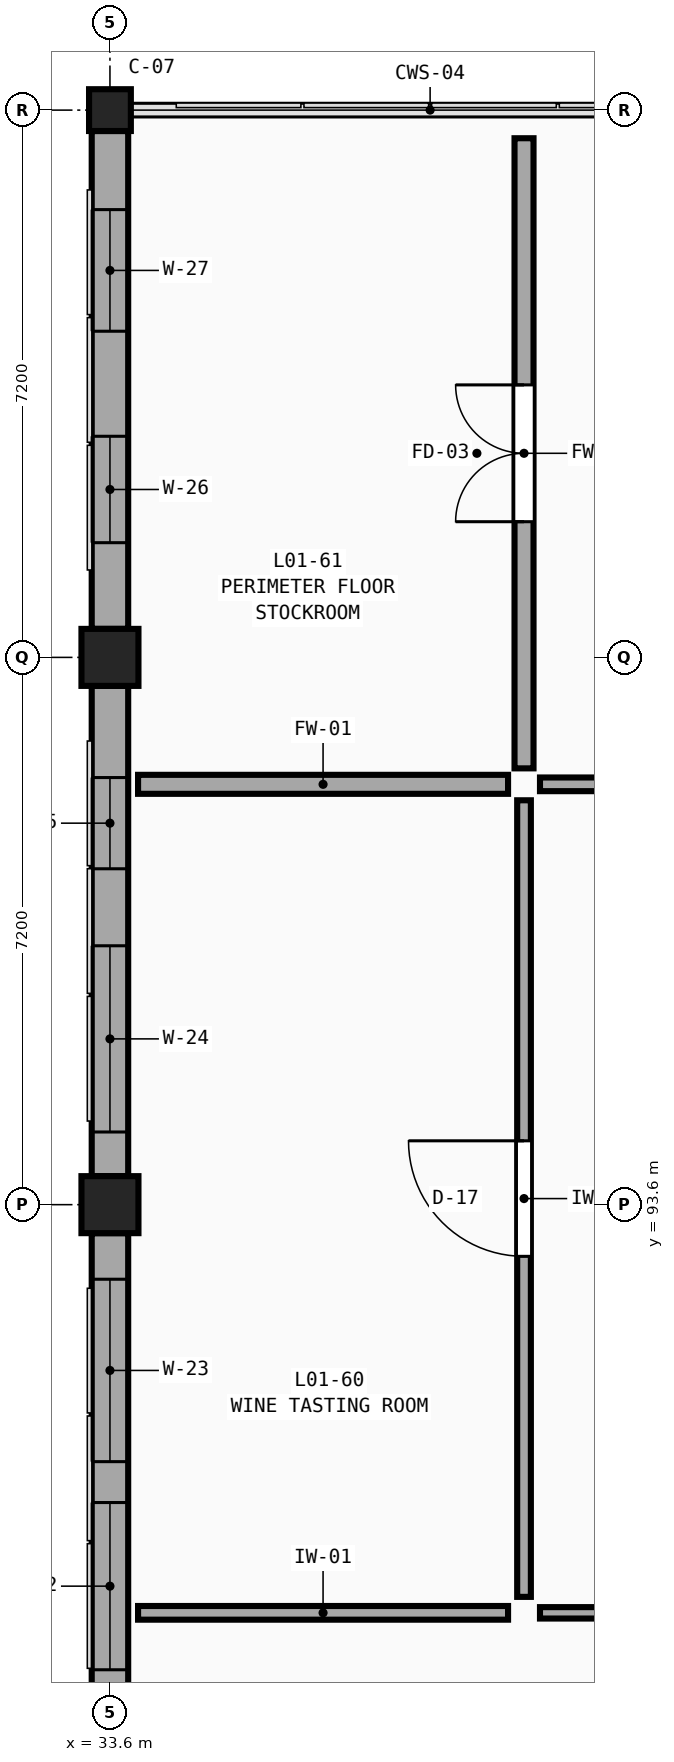
"""IFC4 building model, lengths in metres.
Left out: names, types, materials, properties, quantities, classifications, styles, units other than length and angle.
Written with IfcOpenShell. Run it as: python <this file> out.ifc"""

import sys

from ifc_helpers import new_model, si_unit, direction, frame, frame_2d, origin, origin_2d, place, context, subcontext, project, spatial, rectangle, extrude, element, fill, save


model = new_model("IFC4")
c1 = context("Model", 3, precision=1e-05, world=origin(), true_north=direction((0.0, 1.0)))
c2 = subcontext(c1, "Body", "Model", "MODEL_VIEW")
j1 = project(units=[si_unit("LENGTHUNIT", "METRE"), si_unit("PLANEANGLEUNIT", "RADIAN")], contexts=[c1])
p1 = place(None, origin())
s1 = spatial("IfcSite", under=j1, at=p1, CompositionType="ELEMENT")
p2 = place(p1, origin())
s2 = spatial("IfcBuilding", under=s1, at=p2, CompositionType="ELEMENT")
p3 = place(p2, frame((0.0, 0.0, 5.4)))
s3 = spatial("IfcBuildingStorey", under=s2, at=p3, CompositionType="ELEMENT", Elevation=5.4)
for number, where, z_axis, x_axis in (
    (1, (33.6, 93.6, 0.0), (0.0, 0.0, 1.0), (1.0, 0.0, 0.0)),
    (2, (33.6, 100.8, 0.0), (0.0, 0.0, 1.0), (1.0, 0.0, 0.0)),
):
    element("IfcColumn", number, at=place(p3, frame(where, z_axis=z_axis, x_axis=x_axis)), inside=s3, PredefinedType="COLUMN", context=c2, shape_type="SweptSolid", body=[
        extrude(rectangle(XDim=0.75, YDim=0.75, at=origin_2d()), origin(), (0.0, 0.0, 1.0), 4.5),
    ])
p4 = place(p3, frame((33.6, 108.0, 0.0), z_axis=(0.0, 0.0, 1.0), x_axis=(1.0, 0.0, 0.0)))
e3 = element("IfcColumn", 3, at=p4, inside=s3, PredefinedType="COLUMN", context=c2, shape_type="SweptSolid", body=[
    extrude(rectangle(XDim=0.55, YDim=0.55, at=origin_2d()), origin(), (0.0, 0.0, 1.0), 4.5),
])
p5 = place(p3, frame((33.6, 86.775, 0.0), z_axis=(0.0, 0.0, 1.0), x_axis=(0.0, 1.0, 0.0)))
e4 = element("IfcWall", 4, at=p5, inside=s3, PredefinedType="SOLIDWALL", context=c2, shape_type="SweptSolid", body=[
    extrude(rectangle(XDim=6.45, YDim=0.48, at=frame_2d((3.225, 0.0))), origin(), (0.0, 0.0, 1.0), 3.63),
])
p6 = place(p5, frame((0.706, 0.0, 0.75)))
e5 = element("IfcOpeningElement", 5, at=p6, cuts=e4, PredefinedType="OPENING", context=c2, shape_type="SweptSolid", body=[
    extrude(rectangle(XDim=2.2, YDim=2.26, at=frame_2d((1.1, 1.13))), frame((0.0, 0.26, 0.0), z_axis=(0.0, -1.0, 0.0), x_axis=(1.0, 0.0, 0.0)), (0.0, 0.0, 1.0), 0.52),
])
p7 = place(p5, frame((3.444, 0.0, 0.75)))
e6 = element("IfcOpeningElement", 6, at=p7, cuts=e4, PredefinedType="OPENING", context=c2, shape_type="SweptSolid", body=[
    extrude(rectangle(XDim=2.4, YDim=2.26, at=frame_2d((1.2, 1.13))), frame((0.0, 0.26, 0.0), z_axis=(0.0, -1.0, 0.0), x_axis=(1.0, 0.0, 0.0)), (0.0, 0.0, 1.0), 0.52),
])
p8 = place(p3, frame((33.6, 93.975, 0.0), z_axis=(0.0, 0.0, 1.0), x_axis=(0.0, 1.0, 0.0)))
e7 = element("IfcWall", 7, at=p8, inside=s3, PredefinedType="SOLIDWALL", context=c2, shape_type="SweptSolid", body=[
    extrude(rectangle(XDim=6.45, YDim=0.48, at=frame_2d((3.225, 0.0))), origin(), (0.0, 0.0, 1.0), 3.63),
])
p9 = place(p8, frame((0.581, 0.0, 0.75)))
e8 = element("IfcOpeningElement", 8, at=p9, cuts=e7, PredefinedType="OPENING", context=c2, shape_type="SweptSolid", body=[
    extrude(rectangle(XDim=2.45, YDim=2.26, at=frame_2d((1.225, 1.13))), frame((0.0, 0.26, 0.0), z_axis=(0.0, -1.0, 0.0), x_axis=(1.0, 0.0, 0.0)), (0.0, 0.0, 1.0), 0.52),
])
p10 = place(p8, frame((4.044, 0.0, 0.75)))
e9 = element("IfcOpeningElement", 9, at=p10, cuts=e7, PredefinedType="OPENING", context=c2, shape_type="SweptSolid", body=[
    extrude(rectangle(XDim=1.2, YDim=2.44, at=frame_2d((0.6, 1.22))), frame((0.0, 0.26, 0.0), z_axis=(0.0, -1.0, 0.0), x_axis=(1.0, 0.0, 0.0)), (0.0, 0.0, 1.0), 0.52),
])
p11 = place(p3, frame((33.6, 101.175, 0.0), z_axis=(0.0, 0.0, 1.0), x_axis=(0.0, 1.0, 0.0)))
e10 = element("IfcWall", 10, at=p11, inside=s3, PredefinedType="SOLIDWALL", context=c2, shape_type="SweptSolid", body=[
    extrude(rectangle(XDim=6.55, YDim=0.48, at=frame_2d((3.275, 0.0))), origin(), (0.0, 0.0, 1.0), 3.63),
])
p12 = place(p11, frame((1.134, 0.0, 0.75)))
e11 = element("IfcOpeningElement", 11, at=p12, cuts=e10, PredefinedType="OPENING", context=c2, shape_type="SweptSolid", body=[
    extrude(rectangle(XDim=1.4, YDim=2.44, at=frame_2d((0.7, 1.22))), frame((0.0, 0.26, 0.0), z_axis=(0.0, -1.0, 0.0), x_axis=(1.0, 0.0, 0.0)), (0.0, 0.0, 1.0), 0.52),
])
p13 = place(p11, frame((3.916, 0.0, 0.75)))
e12 = element("IfcOpeningElement", 12, at=p13, cuts=e10, PredefinedType="OPENING", context=c2, shape_type="SweptSolid", body=[
    extrude(rectangle(XDim=1.6, YDim=2.44, at=frame_2d((0.8, 1.22))), frame((0.0, 0.26, 0.0), z_axis=(0.0, -1.0, 0.0), x_axis=(1.0, 0.0, 0.0)), (0.0, 0.0, 1.0), 0.52),
])
p14 = place(p3, frame((39.258, 99.13, 0.0), z_axis=(0.0, 0.0, 1.0), x_axis=(1.0, 0.0, 0.0)))
e13 = element("IfcWall", 13, at=p14, inside=s3, PredefinedType="PARTITIONING", context=c2, shape_type="SweptSolid", body=[
    extrude(rectangle(XDim=22.444, YDim=0.18, at=frame_2d((11.222, 0.0))), origin(), (0.0, 0.0, 1.0), 4.18),
])
p15 = place(p14, frame((8.99, 0.0, 0.0)))
e14 = element("IfcOpeningElement", 14, at=p15, cuts=e13, PredefinedType="OPENING", context=c2, shape_type="SweptSolid", body=[
    extrude(rectangle(XDim=1.04, YDim=2.21, at=frame_2d((0.52, 1.105))), frame((0.0, 0.11, 0.0), z_axis=(0.0, -1.0, 0.0), x_axis=(1.0, 0.0, 0.0)), (0.0, 0.0, 1.0), 0.22),
])
p16 = place(p3, frame((39.258, 88.23, 0.0), z_axis=(0.0, 0.0, 1.0), x_axis=(1.0, 0.0, 0.0)))
e15 = element("IfcWall", 15, at=p16, inside=s3, PredefinedType="PARTITIONING", context=c2, shape_type="SweptSolid", body=[
    extrude(rectangle(XDim=13.952, YDim=0.15, at=frame_2d((6.976, 0.0))), origin(), (0.0, 0.0, 1.0), 4.18),
])
p17 = place(p3, frame((39.048, 88.44, 0.0), z_axis=(0.0, 0.0, 1.0), x_axis=(0.0, 1.0, 0.0)))
e16 = element("IfcWall", 16, at=p17, inside=s3, PredefinedType="PARTITIONING", context=c2, shape_type="SweptSolid", body=[
    extrude(rectangle(XDim=10.48, YDim=0.18, at=frame_2d((5.24, 0.0))), origin(), (0.0, 0.0, 1.0), 4.18),
])
p18 = place(p17, frame((4.48, 0.0, 0.0)))
e17 = element("IfcOpeningElement", 17, at=p18, cuts=e16, PredefinedType="OPENING", context=c2, shape_type="SweptSolid", body=[
    extrude(rectangle(XDim=1.52, YDim=2.21, at=frame_2d((0.76, 1.105))), frame((0.0, 0.11, 0.0), z_axis=(0.0, -1.0, 0.0), x_axis=(1.0, 0.0, 0.0)), (0.0, 0.0, 1.0), 0.22),
])
p19 = place(p3, frame((39.048, 99.34, 0.0), z_axis=(0.0, 0.0, 1.0), x_axis=(0.0, 1.0, 0.0)))
e18 = element("IfcWall", 18, at=p19, inside=s3, PredefinedType="SOLIDWALL", context=c2, shape_type="SweptSolid", body=[
    extrude(rectangle(XDim=8.29, YDim=0.25, at=frame_2d((4.145, 0.0))), origin(), (0.0, 0.0, 1.0), 4.18),
])
p20 = place(p19, frame((3.245, 0.0, 0.0)))
e19 = element("IfcOpeningElement", 19, at=p20, cuts=e18, PredefinedType="OPENING", context=c2, shape_type="SweptSolid", body=[
    extrude(rectangle(XDim=1.8, YDim=2.3, at=frame_2d((0.9, 1.15))), frame((0.0, 0.145, 0.0), z_axis=(0.0, -1.0, 0.0), x_axis=(1.0, 0.0, 0.0)), (0.0, 0.0, 1.0), 0.29),
])
p21 = place(p3, frame((33.97, 88.23, 0.0), z_axis=(0.0, 0.0, 1.0), x_axis=(1.0, 0.0, 0.0)))
e20 = element("IfcWall", 20, at=p21, inside=s3, PredefinedType="PARTITIONING", context=c2, shape_type="SweptSolid", body=[
    extrude(rectangle(XDim=4.868, YDim=0.18, at=frame_2d((2.434, 0.0))), origin(), (0.0, 0.0, 1.0), 4.18),
])
p22 = place(p3, frame((33.97, 99.13, 0.0), z_axis=(0.0, 0.0, 1.0), x_axis=(1.0, 0.0, 0.0)))
e21 = element("IfcWall", 21, at=p22, inside=s3, PredefinedType="SOLIDWALL", context=c2, shape_type="SweptSolid", body=[
    extrude(rectangle(XDim=4.868, YDim=0.25, at=frame_2d((2.434, 0.0))), origin(), (0.0, 0.0, 1.0), 4.18),
])
p23 = place(p6, origin())
e22 = element("IfcWindow", 22, at=p23, inside=s3, PartitioningType="TRIPLE_PANEL_VERTICAL", PredefinedType="WINDOW", context=c2, shape_type="SweptSolid", body=[
    extrude(rectangle(XDim=2.2, YDim=2.26, at=frame_2d((1.1, 1.13))), frame((0.0, 0.03, 0.0), z_axis=(0.0, -1.0, 0.0), x_axis=(1.0, 0.0, 0.0)), (0.0, 0.0, 1.0), 0.06),
])
fill(e5, e22)
p24 = place(p7, origin())
e23 = element("IfcWindow", 23, at=p24, inside=s3, PartitioningType="TRIPLE_PANEL_VERTICAL", PredefinedType="WINDOW", context=c2, shape_type="SweptSolid", body=[
    extrude(rectangle(XDim=2.4, YDim=2.26, at=frame_2d((1.2, 1.13))), frame((0.0, 0.03, 0.0), z_axis=(0.0, -1.0, 0.0), x_axis=(1.0, 0.0, 0.0)), (0.0, 0.0, 1.0), 0.06),
])
fill(e6, e23)
p25 = place(p9, origin())
e24 = element("IfcWindow", 24, at=p25, inside=s3, PartitioningType="TRIPLE_PANEL_VERTICAL", PredefinedType="WINDOW", context=c2, shape_type="SweptSolid", body=[
    extrude(rectangle(XDim=2.45, YDim=2.26, at=frame_2d((1.225, 1.13))), frame((0.0, 0.03, 0.0), z_axis=(0.0, -1.0, 0.0), x_axis=(1.0, 0.0, 0.0)), (0.0, 0.0, 1.0), 0.06),
])
fill(e8, e24)
p26 = place(p10, origin())
e25 = element("IfcWindow", 25, at=p26, inside=s3, PartitioningType="SINGLE_PANEL", PredefinedType="WINDOW", context=c2, shape_type="SweptSolid", body=[
    extrude(rectangle(XDim=1.2, YDim=2.44, at=frame_2d((0.6, 1.22))), frame((0.0, 0.03, 0.0), z_axis=(0.0, -1.0, 0.0), x_axis=(1.0, 0.0, 0.0)), (0.0, 0.0, 1.0), 0.06),
])
fill(e9, e25)
p27 = place(p12, origin())
e26 = element("IfcWindow", 26, at=p27, inside=s3, PartitioningType="DOUBLE_PANEL_VERTICAL", PredefinedType="WINDOW", context=c2, shape_type="SweptSolid", body=[
    extrude(rectangle(XDim=1.4, YDim=2.44, at=frame_2d((0.7, 1.22))), frame((0.0, 0.03, 0.0), z_axis=(0.0, -1.0, 0.0), x_axis=(1.0, 0.0, 0.0)), (0.0, 0.0, 1.0), 0.06),
])
fill(e11, e26)
p28 = place(p13, origin())
e27 = element("IfcWindow", 27, at=p28, inside=s3, PartitioningType="DOUBLE_PANEL_VERTICAL", PredefinedType="WINDOW", context=c2, shape_type="SweptSolid", body=[
    extrude(rectangle(XDim=1.6, YDim=2.44, at=frame_2d((0.8, 1.22))), frame((0.0, 0.03, 0.0), z_axis=(0.0, -1.0, 0.0), x_axis=(1.0, 0.0, 0.0)), (0.0, 0.0, 1.0), 0.06),
])
fill(e12, e27)
p29 = place(p18, origin())
e28 = element("IfcDoor", 28, at=p29, inside=s3, OperationType="SINGLE_SWING_RIGHT", PredefinedType="DOOR", context=c2, shape_type="SweptSolid", body=[
    extrude(rectangle(XDim=1.52, YDim=2.21, at=frame_2d((0.76, 1.105))), frame((0.0, 0.025, 0.0), z_axis=(0.0, -1.0, 0.0), x_axis=(1.0, 0.0, 0.0)), (0.0, 0.0, 1.0), 0.05),
])
fill(e17, e28)
p30 = place(p20, origin())
e29 = element("IfcDoor", 29, at=p30, inside=s3, OperationType="DOUBLE_DOOR_SINGLE_SWING", PredefinedType="DOOR", context=c2, shape_type="SweptSolid", body=[
    extrude(rectangle(XDim=1.8, YDim=2.3, at=frame_2d((0.9, 1.15))), frame((0.0, 0.025, 0.0), z_axis=(0.0, -1.0, 0.0), x_axis=(1.0, 0.0, 0.0)), (0.0, 0.0, 1.0), 0.05),
])
fill(e19, e29)
save(model, sys.argv[1])
